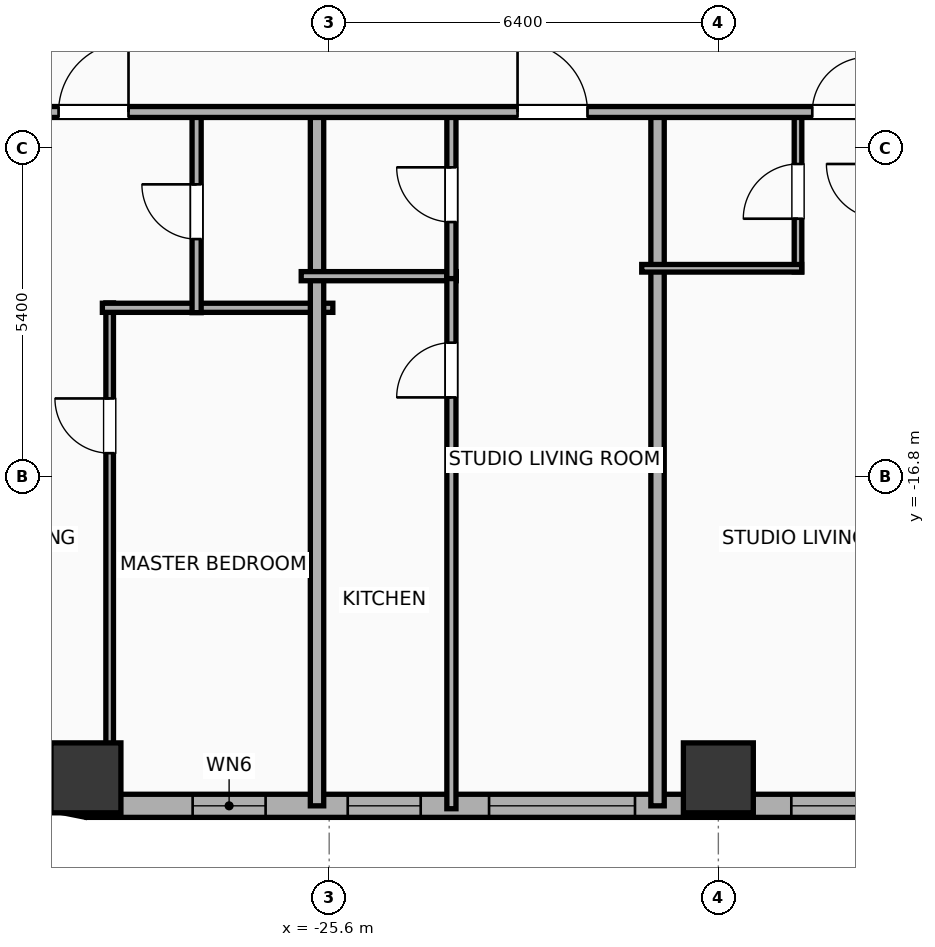
"""IFC4 building model, lengths in metres.
Left out: names, types, materials, properties, quantities, classifications, styles, units other than length and angle.
Written with IfcOpenShell. Run it as: python <this file> out.ifc"""

import sys

from ifc_helpers import new_model, si_unit, direction, frame, frame_2d, origin, origin_2d, place, context, subcontext, project, spatial, rectangle, hollow_rectangle, extrude, element, fill, save


model = new_model("IFC4")
c1 = context("Model", 3, precision=1e-05, world=origin(), true_north=direction((0.0, 1.0)))
c2 = subcontext(c1, "Body", "Model", "MODEL_VIEW")
j1 = project(units=[si_unit("LENGTHUNIT", "METRE"), si_unit("PLANEANGLEUNIT", "RADIAN")], contexts=[c1])
p1 = place(None, origin())
s1 = spatial("IfcSite", under=j1, at=p1, CompositionType="ELEMENT")
p2 = place(p1, origin())
s2 = spatial("IfcBuilding", under=s1, at=p2, CompositionType="ELEMENT")
p3 = place(p2, frame((0.0, 0.0, 29.9)))
s3 = spatial("IfcBuildingStorey", under=s2, at=p3, CompositionType="ELEMENT", Elevation=29.9)
for number, where, z_axis, x_axis in (
    (1, (-29.6, -21.75, 0.0), (0.0, 0.0, 1.0), (1.0, 0.0, 0.0)),
    (2, (-19.2, -21.75, 0.0), (0.0, 0.0, 1.0), (1.0, 0.0, 0.0)),
):
    element("IfcColumn", number, at=place(p3, frame(where, z_axis=z_axis, x_axis=x_axis)), inside=s3, PredefinedType="COLUMN", context=c2, shape_type="SweptSolid", body=[
        extrude(hollow_rectangle(XDim=1.15, YDim=1.15, WallThickness=0.04, at=origin_2d()), origin(), (0.0, 0.0, 1.0), 3.9),
    ])
p4 = place(p3, frame((22.381, -22.21, 0.0), z_axis=(0.0, 0.0, 1.0), x_axis=(-1.0, 0.0, 0.0)))
e3 = element("IfcWall", 3, at=p4, inside=s3, PredefinedType="ELEMENTEDWALL", context=c2, shape_type="SweptSolid", body=[
    extrude(rectangle(XDim=51.963, YDim=0.38, at=frame_2d((25.981, 0.0))), origin(), (0.0, 0.0, 1.0), 2.54),
])
p5 = place(p4, frame((5.81, 0.0, 0.75)))
e4 = element("IfcOpeningElement", 4, at=p5, cuts=e3, PredefinedType="OPENING", context=c2, shape_type="SweptSolid", body=[
    extrude(rectangle(XDim=2.4, YDim=1.63, at=frame_2d((1.2, 0.815))), frame((0.0, 0.2, 0.0), z_axis=(0.0, -1.0, 0.0), x_axis=(1.0, 0.0, 0.0)), (0.0, 0.0, 1.0), 0.4),
])
p6 = place(p4, frame((26.431, 0.0, 0.75)))
e5 = element("IfcOpeningElement", 5, at=p6, cuts=e3, PredefinedType="OPENING", context=c2, shape_type="SweptSolid", body=[
    extrude(rectangle(XDim=2.4, YDim=1.63, at=frame_2d((1.2, 0.815))), frame((0.0, 0.2, 0.0), z_axis=(0.0, -1.0, 0.0), x_axis=(1.0, 0.0, 0.0)), (0.0, 0.0, 1.0), 0.4),
])
p7 = place(p4, frame((42.952, 0.0, 0.75)))
e6 = element("IfcOpeningElement", 6, at=p7, cuts=e3, PredefinedType="OPENING", context=c2, shape_type="SweptSolid", body=[
    extrude(rectangle(XDim=2.4, YDim=1.63, at=frame_2d((1.2, 0.815))), frame((0.0, 0.2, 0.0), z_axis=(0.0, -1.0, 0.0), x_axis=(1.0, 0.0, 0.0)), (0.0, 0.0, 1.0), 0.4),
])
p8 = place(p4, frame((49.027, 0.0, 0.75)))
e7 = element("IfcOpeningElement", 7, at=p8, cuts=e3, PredefinedType="OPENING", context=c2, shape_type="SweptSolid", body=[
    extrude(rectangle(XDim=1.2, YDim=1.63, at=frame_2d((0.6, 0.815))), frame((0.0, 0.2, 0.0), z_axis=(0.0, -1.0, 0.0), x_axis=(1.0, 0.0, 0.0)), (0.0, 0.0, 1.0), 0.4),
])
p9 = place(p4, frame((46.476, 0.0, 0.75)))
e8 = element("IfcOpeningElement", 8, at=p9, cuts=e3, PredefinedType="OPENING", context=c2, shape_type="SweptSolid", body=[
    extrude(rectangle(XDim=1.2, YDim=1.63, at=frame_2d((0.6, 0.815))), frame((0.0, 0.2, 0.0), z_axis=(0.0, -1.0, 0.0), x_axis=(1.0, 0.0, 0.0)), (0.0, 0.0, 1.0), 0.4),
])
p10 = place(p4, frame((39.181, 0.0, 0.75)))
e9 = element("IfcOpeningElement", 9, at=p10, cuts=e3, PredefinedType="OPENING", context=c2, shape_type="SweptSolid", body=[
    extrude(rectangle(XDim=1.2, YDim=1.63, at=frame_2d((0.6, 0.815))), frame((0.0, 0.2, 0.0), z_axis=(0.0, -1.0, 0.0), x_axis=(1.0, 0.0, 0.0)), (0.0, 0.0, 1.0), 0.4),
])
p11 = place(p4, frame((32.476, 0.0, 0.75)))
e10 = element("IfcOpeningElement", 10, at=p11, cuts=e3, PredefinedType="OPENING", context=c2, shape_type="SweptSolid", body=[
    extrude(rectangle(XDim=1.2, YDim=1.63, at=frame_2d((0.6, 0.815))), frame((0.0, 0.2, 0.0), z_axis=(0.0, -1.0, 0.0), x_axis=(1.0, 0.0, 0.0)), (0.0, 0.0, 1.0), 0.4),
])
p12 = place(p4, frame((35.276, 0.0, 0.75)))
e11 = element("IfcOpeningElement", 11, at=p12, cuts=e3, PredefinedType="OPENING", context=c2, shape_type="SweptSolid", body=[
    extrude(rectangle(XDim=1.2, YDim=1.63, at=frame_2d((0.6, 0.815))), frame((0.0, 0.2, 0.0), z_axis=(0.0, -1.0, 0.0), x_axis=(1.0, 0.0, 0.0)), (0.0, 0.0, 1.0), 0.4),
])
p13 = place(p4, frame((29.491, 0.0, 0.75)))
e12 = element("IfcOpeningElement", 12, at=p13, cuts=e3, PredefinedType="OPENING", context=c2, shape_type="SweptSolid", body=[
    extrude(rectangle(XDim=0.85, YDim=1.63, at=frame_2d((0.425, 0.815))), frame((0.0, 0.2, 0.0), z_axis=(0.0, -1.0, 0.0), x_axis=(1.0, 0.0, 0.0)), (0.0, 0.0, 1.0), 0.4),
])
p14 = place(p4, frame((21.596, 0.0, 0.75)))
e13 = element("IfcOpeningElement", 13, at=p14, cuts=e3, PredefinedType="OPENING", context=c2, shape_type="SweptSolid", body=[
    extrude(rectangle(XDim=1.2, YDim=1.63, at=frame_2d((0.6, 0.815))), frame((0.0, 0.2, 0.0), z_axis=(0.0, -1.0, 0.0), x_axis=(1.0, 0.0, 0.0)), (0.0, 0.0, 1.0), 0.4),
])
p15 = place(p4, frame((24.036, 0.0, 0.75)))
e14 = element("IfcOpeningElement", 14, at=p15, cuts=e3, PredefinedType="OPENING", context=c2, shape_type="SweptSolid", body=[
    extrude(rectangle(XDim=1.2, YDim=1.63, at=frame_2d((0.6, 0.815))), frame((0.0, 0.2, 0.0), z_axis=(0.0, -1.0, 0.0), x_axis=(1.0, 0.0, 0.0)), (0.0, 0.0, 1.0), 0.4),
])
p16 = place(p4, frame((17.886, 0.0, 0.75)))
e15 = element("IfcOpeningElement", 15, at=p16, cuts=e3, PredefinedType="OPENING", context=c2, shape_type="SweptSolid", body=[
    extrude(rectangle(XDim=1.2, YDim=1.63, at=frame_2d((0.6, 0.815))), frame((0.0, 0.2, 0.0), z_axis=(0.0, -1.0, 0.0), x_axis=(1.0, 0.0, 0.0)), (0.0, 0.0, 1.0), 0.4),
])
p17 = place(p4, frame((15.086, 0.0, 0.75)))
e16 = element("IfcOpeningElement", 16, at=p17, cuts=e3, PredefinedType="OPENING", context=c2, shape_type="SweptSolid", body=[
    extrude(rectangle(XDim=1.2, YDim=1.63, at=frame_2d((0.6, 0.815))), frame((0.0, 0.2, 0.0), z_axis=(0.0, -1.0, 0.0), x_axis=(1.0, 0.0, 0.0)), (0.0, 0.0, 1.0), 0.4),
])
p18 = place(p4, frame((11.181, 0.0, 0.75)))
e17 = element("IfcOpeningElement", 17, at=p18, cuts=e3, PredefinedType="OPENING", context=c2, shape_type="SweptSolid", body=[
    extrude(rectangle(XDim=1.2, YDim=1.63, at=frame_2d((0.6, 0.815))), frame((0.0, 0.2, 0.0), z_axis=(0.0, -1.0, 0.0), x_axis=(1.0, 0.0, 0.0)), (0.0, 0.0, 1.0), 0.4),
])
p19 = place(p4, frame((3.886, 0.0, 0.75)))
e18 = element("IfcOpeningElement", 18, at=p19, cuts=e3, PredefinedType="OPENING", context=c2, shape_type="SweptSolid", body=[
    extrude(rectangle(XDim=1.2, YDim=1.63, at=frame_2d((0.6, 0.815))), frame((0.0, 0.2, 0.0), z_axis=(0.0, -1.0, 0.0), x_axis=(1.0, 0.0, 0.0)), (0.0, 0.0, 1.0), 0.4),
])
p20 = place(p4, frame((1.536, 0.0, 0.75)))
e19 = element("IfcOpeningElement", 19, at=p20, cuts=e3, PredefinedType="OPENING", context=c2, shape_type="SweptSolid", body=[
    extrude(rectangle(XDim=1.2, YDim=1.63, at=frame_2d((0.6, 0.815))), frame((0.0, 0.2, 0.0), z_axis=(0.0, -1.0, 0.0), x_axis=(1.0, 0.0, 0.0)), (0.0, 0.0, 1.0), 0.4),
])
p21 = place(p3, frame((-29.581, -22.21, 0.0), z_axis=(0.0, 0.0, 1.0), x_axis=(-0.980786132421, 0.195086038585, 0.0)))
e20 = element("IfcWall", 20, at=p21, inside=s3, PredefinedType="ELEMENTEDWALL", context=c2, shape_type="SweptSolid", body=[
    extrude(rectangle(XDim=1.504, YDim=0.38, at=frame_2d((0.752, 0.0))), origin(), (0.0, 0.0, 1.0), 2.54),
])
p22 = place(p3, frame((-29.21, -22.36, 0.0), z_axis=(0.0, 0.0, 1.0), x_axis=(0.0, 1.0, 0.0)))
e21 = element("IfcWall", 21, at=p22, inside=s3, PredefinedType="PARTITIONING", context=c2, shape_type="SweptSolid", body=[
    extrude(rectangle(XDim=8.42, YDim=0.125, at=frame_2d((4.21, 0.0))), origin(), (0.0, 0.0, 1.0), 3.65),
])
p23 = place(p22, frame((5.949, 0.0, 0.0)))
e22 = element("IfcOpeningElement", 22, at=p23, cuts=e21, PredefinedType="OPENING", context=c2, shape_type="SweptSolid", body=[
    extrude(rectangle(XDim=0.9, YDim=2.05, at=frame_2d((0.45, 1.025))), frame((0.0, 0.073, 0.0), z_axis=(0.0, -1.0, 0.0), x_axis=(1.0, 0.0, 0.0)), (0.0, 0.0, 1.0), 0.145),
])
p24 = place(p3, frame((-29.33, -14.02, 0.0), z_axis=(0.0, 0.0, 1.0), x_axis=(1.0, 0.0, 0.0)))
e23 = element("IfcWall", 23, at=p24, inside=s3, PredefinedType="PLUMBINGWALL", context=c2, shape_type="SweptSolid", body=[
    extrude(rectangle(XDim=3.79, YDim=0.15, at=frame_2d((1.895, 0.0))), origin(), (0.0, 0.0, 1.0), 3.65),
])
p25 = place(p3, frame((-27.78, -14.1, 0.0), z_axis=(0.0, 0.0, 1.0), x_axis=(0.0, 1.0, 0.0)))
e24 = element("IfcWall", 24, at=p25, inside=s3, PredefinedType="PLUMBINGWALL", context=c2, shape_type="SweptSolid", body=[
    extrude(rectangle(XDim=3.32, YDim=0.15, at=frame_2d((1.66, 0.0))), origin(), (0.0, 0.0, 1.0), 3.65),
])
p26 = place(p25, frame((1.21, 0.0, 0.0)))
e25 = element("IfcOpeningElement", 25, at=p26, cuts=e24, PredefinedType="OPENING", context=c2, shape_type="SweptSolid", body=[
    extrude(rectangle(XDim=0.9, YDim=2.05, at=frame_2d((0.45, 1.025))), frame((0.0, 0.085, 0.0), z_axis=(0.0, -1.0, 0.0), x_axis=(1.0, 0.0, 0.0)), (0.0, 0.0, 1.0), 0.17),
])
p27 = place(p3, frame((-25.8, -22.21, 0.0), z_axis=(0.0, 0.0, 1.0), x_axis=(0.0, 1.0, 0.0)))
e26 = element("IfcWall", 26, at=p27, inside=s3, PredefinedType="PARTITIONING", context=c2, shape_type="SweptSolid", body=[
    extrude(rectangle(XDim=11.49, YDim=0.22, at=frame_2d((5.745, 0.0))), origin(), (0.0, 0.0, 1.0), 3.65),
])
p28 = place(p3, frame((-26.06, -13.5, 0.0), z_axis=(0.0, 0.0, 1.0), x_axis=(1.0, 0.0, 0.0)))
e27 = element("IfcWall", 27, at=p28, inside=s3, PredefinedType="PLUMBINGWALL", context=c2, shape_type="SweptSolid", body=[
    extrude(rectangle(XDim=2.55, YDim=0.15, at=frame_2d((1.275, 0.0))), origin(), (0.0, 0.0, 1.0), 3.65),
])
p29 = place(p3, frame((-23.59, -22.258, 0.0), z_axis=(0.0, 0.0, 1.0), x_axis=(0.0, 1.0, 0.0)))
e28 = element("IfcWall", 28, at=p29, inside=s3, PredefinedType="PLUMBINGWALL", context=c2, shape_type="SweptSolid", body=[
    extrude(rectangle(XDim=8.798, YDim=0.15, at=frame_2d((4.399, 0.0))), origin(), (0.0, 0.0, 1.0), 3.65),
])
p30 = place(p29, frame((6.764, 0.0, 0.0)))
e29 = element("IfcOpeningElement", 29, at=p30, cuts=e28, PredefinedType="OPENING", context=c2, shape_type="SweptSolid", body=[
    extrude(rectangle(XDim=0.9, YDim=2.05, at=frame_2d((0.45, 1.025))), frame((0.0, 0.085, 0.0), z_axis=(0.0, -1.0, 0.0), x_axis=(1.0, 0.0, 0.0)), (0.0, 0.0, 1.0), 0.17),
])
p31 = place(p3, frame((-23.59, -13.54, 0.0), z_axis=(0.0, 0.0, 1.0), x_axis=(0.0, 1.0, 0.0)))
e30 = element("IfcWall", 30, at=p31, inside=s3, PredefinedType="PLUMBINGWALL", context=c2, shape_type="SweptSolid", body=[
    extrude(rectangle(XDim=2.76, YDim=0.15, at=frame_2d((1.38, 0.0))), origin(), (0.0, 0.0, 1.0), 3.65),
])
p32 = place(p31, frame((0.93, 0.0, 0.0)))
e31 = element("IfcOpeningElement", 31, at=p32, cuts=e30, PredefinedType="OPENING", context=c2, shape_type="SweptSolid", body=[
    extrude(rectangle(XDim=0.9, YDim=2.05, at=frame_2d((0.45, 1.025))), frame((0.0, 0.085, 0.0), z_axis=(0.0, -1.0, 0.0), x_axis=(1.0, 0.0, 0.0)), (0.0, 0.0, 1.0), 0.17),
])
p33 = place(p3, frame((-20.2, -22.21, 0.0), z_axis=(0.0, 0.0, 1.0), x_axis=(0.0, 1.0, 0.0)))
e32 = element("IfcWall", 32, at=p33, inside=s3, PredefinedType="PARTITIONING", context=c2, shape_type="SweptSolid", body=[
    extrude(rectangle(XDim=11.49, YDim=0.22, at=frame_2d((5.745, 0.0))), origin(), (0.0, 0.0, 1.0), 3.65),
])
p34 = place(p3, frame((-17.89, -13.43, 0.0), z_axis=(0.0, 0.0, 1.0), x_axis=(0.0, 1.0, 0.0)))
e33 = element("IfcWall", 33, at=p34, inside=s3, PredefinedType="PARTITIONING", context=c2, shape_type="SweptSolid", body=[
    extrude(rectangle(XDim=2.65, YDim=0.125, at=frame_2d((1.325, 0.0))), origin(), (0.0, 0.0, 1.0), 3.65),
])
p35 = place(p34, frame((0.875, 0.0, 0.0)))
e34 = element("IfcOpeningElement", 34, at=p35, cuts=e33, PredefinedType="OPENING", context=c2, shape_type="SweptSolid", body=[
    extrude(rectangle(XDim=0.9, YDim=2.05, at=frame_2d((0.45, 1.025))), frame((0.0, 0.073, 0.0), z_axis=(0.0, -1.0, 0.0), x_axis=(1.0, 0.0, 0.0)), (0.0, 0.0, 1.0), 0.145),
])
p36 = place(p3, frame((-20.46, -13.37, 0.0), z_axis=(0.0, 0.0, 1.0), x_axis=(1.0, 0.0, 0.0)))
e35 = element("IfcWall", 35, at=p36, inside=s3, PredefinedType="PARTITIONING", context=c2, shape_type="SweptSolid", body=[
    extrude(rectangle(XDim=2.63, YDim=0.125, at=frame_2d((1.315, 0.0))), origin(), (0.0, 0.0, 1.0), 3.65),
])
p37 = place(p3, frame((-33.41, -10.8, 0.0), z_axis=(0.0, 0.0, 1.0), x_axis=(1.0, 0.0, 0.0)))
e36 = element("IfcWall", 36, at=p37, inside=s3, PredefinedType="PARTITIONING", context=c2, shape_type="SweptSolid", body=[
    extrude(rectangle(XDim=59.62, YDim=0.18, at=frame_2d((29.81, 0.0))), origin(), (0.0, 0.0, 1.0), 3.65),
])
p38 = place(p37, frame((3.36, 0.0, 0.0)))
e37 = element("IfcOpeningElement", 37, at=p38, cuts=e36, PredefinedType="OPENING", context=c2, shape_type="SweptSolid", body=[
    extrude(rectangle(XDim=1.15, YDim=2.05, at=frame_2d((0.575, 1.025))), frame((0.0, 0.1, 0.0), z_axis=(0.0, -1.0, 0.0), x_axis=(1.0, 0.0, 0.0)), (0.0, 0.0, 1.0), 0.2),
])
p39 = place(p37, frame((10.908, 0.0, 0.0)))
e38 = element("IfcOpeningElement", 38, at=p39, cuts=e36, PredefinedType="OPENING", context=c2, shape_type="SweptSolid", body=[
    extrude(rectangle(XDim=1.15, YDim=2.05, at=frame_2d((0.575, 1.025))), frame((0.0, 0.1, 0.0), z_axis=(0.0, -1.0, 0.0), x_axis=(1.0, 0.0, 0.0)), (0.0, 0.0, 1.0), 0.2),
])
p40 = place(p37, frame((15.755, 0.0, 0.0)))
e39 = element("IfcOpeningElement", 39, at=p40, cuts=e36, PredefinedType="OPENING", context=c2, shape_type="SweptSolid", body=[
    extrude(rectangle(XDim=0.9, YDim=2.05, at=frame_2d((0.45, 1.025))), frame((0.0, 0.1, 0.0), z_axis=(0.0, -1.0, 0.0), x_axis=(1.0, 0.0, 0.0)), (0.0, 0.0, 1.0), 0.2),
])
p41 = place(p37, frame((22.11, 0.0, 0.0)))
e40 = element("IfcOpeningElement", 40, at=p41, cuts=e36, PredefinedType="OPENING", context=c2, shape_type="SweptSolid", body=[
    extrude(rectangle(XDim=1.15, YDim=2.05, at=frame_2d((0.575, 1.025))), frame((0.0, 0.1, 0.0), z_axis=(0.0, -1.0, 0.0), x_axis=(1.0, 0.0, 0.0)), (0.0, 0.0, 1.0), 0.2),
])
p42 = place(p37, frame((27.709, 0.0, 0.0)))
e41 = element("IfcOpeningElement", 41, at=p42, cuts=e36, PredefinedType="OPENING", context=c2, shape_type="SweptSolid", body=[
    extrude(rectangle(XDim=1.15, YDim=2.05, at=frame_2d((0.575, 1.025))), frame((0.0, 0.1, 0.0), z_axis=(0.0, -1.0, 0.0), x_axis=(1.0, 0.0, 0.0)), (0.0, 0.0, 1.0), 0.2),
])
p43 = place(p37, frame((33.349, 0.0, 0.0)))
e42 = element("IfcOpeningElement", 42, at=p43, cuts=e36, PredefinedType="OPENING", context=c2, shape_type="SweptSolid", body=[
    extrude(rectangle(XDim=1.15, YDim=2.05, at=frame_2d((0.575, 1.025))), frame((0.0, 0.1, 0.0), z_axis=(0.0, -1.0, 0.0), x_axis=(1.0, 0.0, 0.0)), (0.0, 0.0, 1.0), 0.2),
])
p44 = place(p37, frame((36.759, 0.0, 0.0)))
e43 = element("IfcOpeningElement", 43, at=p44, cuts=e36, PredefinedType="OPENING", context=c2, shape_type="SweptSolid", body=[
    extrude(rectangle(XDim=1.15, YDim=2.05, at=frame_2d((0.575, 1.025))), frame((0.0, 0.1, 0.0), z_axis=(0.0, -1.0, 0.0), x_axis=(1.0, 0.0, 0.0)), (0.0, 0.0, 1.0), 0.2),
])
p45 = place(p37, frame((43.752, 0.0, 0.0)))
e44 = element("IfcOpeningElement", 44, at=p45, cuts=e36, PredefinedType="OPENING", context=c2, shape_type="SweptSolid", body=[
    extrude(rectangle(XDim=0.9, YDim=2.05, at=frame_2d((0.45, 1.025))), frame((0.0, 0.1, 0.0), z_axis=(0.0, -1.0, 0.0), x_axis=(1.0, 0.0, 0.0)), (0.0, 0.0, 1.0), 0.2),
])
p46 = place(p37, frame((47.962, 0.0, 0.0)))
e45 = element("IfcOpeningElement", 45, at=p46, cuts=e36, PredefinedType="OPENING", context=c2, shape_type="SweptSolid", body=[
    extrude(rectangle(XDim=1.15, YDim=2.05, at=frame_2d((0.575, 1.025))), frame((0.0, 0.1, 0.0), z_axis=(0.0, -1.0, 0.0), x_axis=(1.0, 0.0, 0.0)), (0.0, 0.0, 1.0), 0.2),
])
p47 = place(p37, frame((55.641, 0.0, 0.0)))
e46 = element("IfcOpeningElement", 46, at=p47, cuts=e36, PredefinedType="OPENING", context=c2, shape_type="SweptSolid", body=[
    extrude(rectangle(XDim=1.15, YDim=2.05, at=frame_2d((0.575, 1.025))), frame((0.0, 0.1, 0.0), z_axis=(0.0, -1.0, 0.0), x_axis=(1.0, 0.0, 0.0)), (0.0, 0.0, 1.0), 0.2),
])
p48 = place(p7, origin())
e47 = element("IfcWindow", 47, at=p48, inside=s3, PartitioningType="SINGLE_PANEL", PredefinedType="WINDOW", context=c2, shape_type="SweptSolid", body=[
    extrude(rectangle(XDim=2.4, YDim=1.63, at=frame_2d((1.2, 0.815))), frame((0.0, 0.03, 0.0), z_axis=(0.0, -1.0, 0.0), x_axis=(1.0, 0.0, 0.0)), (0.0, 0.0, 1.0), 0.06),
])
fill(e6, e47)
p49 = place(p8, origin())
e48 = element("IfcWindow", 48, at=p49, inside=s3, PartitioningType="SINGLE_PANEL", PredefinedType="WINDOW", context=c2, shape_type="SweptSolid", body=[
    extrude(rectangle(XDim=1.2, YDim=1.63, at=frame_2d((0.6, 0.815))), frame((0.0, 0.03, 0.0), z_axis=(0.0, -1.0, 0.0), x_axis=(1.0, 0.0, 0.0)), (0.0, 0.0, 1.0), 0.06),
])
fill(e7, e48)
p50 = place(p9, origin())
e49 = element("IfcWindow", 49, at=p50, inside=s3, PartitioningType="SINGLE_PANEL", PredefinedType="WINDOW", context=c2, shape_type="SweptSolid", body=[
    extrude(rectangle(XDim=1.2, YDim=1.63, at=frame_2d((0.6, 0.815))), frame((0.0, 0.03, 0.0), z_axis=(0.0, -1.0, 0.0), x_axis=(1.0, 0.0, 0.0)), (0.0, 0.0, 1.0), 0.06),
])
fill(e8, e49)
p51 = place(p10, origin())
e50 = element("IfcWindow", 50, at=p51, inside=s3, PartitioningType="SINGLE_PANEL", PredefinedType="WINDOW", context=c2, shape_type="SweptSolid", body=[
    extrude(rectangle(XDim=1.2, YDim=1.63, at=frame_2d((0.6, 0.815))), frame((0.0, 0.03, 0.0), z_axis=(0.0, -1.0, 0.0), x_axis=(1.0, 0.0, 0.0)), (0.0, 0.0, 1.0), 0.06),
])
fill(e9, e50)
p52 = place(p23, origin())
e51 = element("IfcDoor", 51, at=p52, inside=s3, OperationType="SINGLE_SWING_RIGHT", PredefinedType="DOOR", context=c2, shape_type="SweptSolid", body=[
    extrude(rectangle(XDim=0.9, YDim=2.05, at=frame_2d((0.45, 1.025))), frame((0.0, 0.025, 0.0), z_axis=(0.0, -1.0, 0.0), x_axis=(1.0, 0.0, 0.0)), (0.0, 0.0, 1.0), 0.05),
])
fill(e22, e51)
p53 = place(p26, origin())
e52 = element("IfcDoor", 52, at=p53, inside=s3, OperationType="SINGLE_SWING_RIGHT", PredefinedType="DOOR", context=c2, shape_type="SweptSolid", body=[
    extrude(rectangle(XDim=0.9, YDim=2.05, at=frame_2d((0.45, 1.025))), frame((0.0, 0.025, 0.0), z_axis=(0.0, -1.0, 0.0), x_axis=(1.0, 0.0, 0.0)), (0.0, 0.0, 1.0), 0.05),
])
fill(e25, e52)
p54 = place(p30, origin())
e53 = element("IfcDoor", 53, at=p54, inside=s3, OperationType="SINGLE_SWING_LEFT", PredefinedType="DOOR", context=c2, shape_type="SweptSolid", body=[
    extrude(rectangle(XDim=0.9, YDim=2.05, at=frame_2d((0.45, 1.025))), frame((0.0, 0.025, 0.0), z_axis=(0.0, -1.0, 0.0), x_axis=(1.0, 0.0, 0.0)), (0.0, 0.0, 1.0), 0.05),
])
fill(e29, e53)
p55 = place(p32, origin())
e54 = element("IfcDoor", 54, at=p55, inside=s3, OperationType="SINGLE_SWING_RIGHT", PredefinedType="DOOR", context=c2, shape_type="SweptSolid", body=[
    extrude(rectangle(XDim=0.9, YDim=2.05, at=frame_2d((0.45, 1.025))), frame((0.0, 0.025, 0.0), z_axis=(0.0, -1.0, 0.0), x_axis=(1.0, 0.0, 0.0)), (0.0, 0.0, 1.0), 0.05),
])
fill(e31, e54)
p56 = place(p35, origin())
e55 = element("IfcDoor", 55, at=p56, inside=s3, OperationType="SINGLE_SWING_LEFT", PredefinedType="DOOR", context=c2, shape_type="SweptSolid", body=[
    extrude(rectangle(XDim=0.9, YDim=2.05, at=frame_2d((0.45, 1.025))), frame((0.0, 0.025, 0.0), z_axis=(0.0, -1.0, 0.0), x_axis=(1.0, 0.0, 0.0)), (0.0, 0.0, 1.0), 0.05),
])
fill(e34, e55)
p57 = place(p38, origin())
e56 = element("IfcDoor", 56, at=p57, inside=s3, OperationType="SINGLE_SWING_RIGHT", PredefinedType="DOOR", context=c2, shape_type="SweptSolid", body=[
    extrude(rectangle(XDim=1.15, YDim=2.05, at=frame_2d((0.575, 1.025))), frame((0.0, 0.025, 0.0), z_axis=(0.0, -1.0, 0.0), x_axis=(1.0, 0.0, 0.0)), (0.0, 0.0, 1.0), 0.05),
])
fill(e37, e56)
p58 = place(p39, origin())
e57 = element("IfcDoor", 57, at=p58, inside=s3, OperationType="SINGLE_SWING_LEFT", PredefinedType="DOOR", context=c2, shape_type="SweptSolid", body=[
    extrude(rectangle(XDim=1.15, YDim=2.05, at=frame_2d((0.575, 1.025))), frame((0.0, 0.025, 0.0), z_axis=(0.0, -1.0, 0.0), x_axis=(1.0, 0.0, 0.0)), (0.0, 0.0, 1.0), 0.05),
])
fill(e38, e57)
p59 = place(p40, origin())
e58 = element("IfcDoor", 58, at=p59, inside=s3, OperationType="SINGLE_SWING_RIGHT", PredefinedType="DOOR", context=c2, shape_type="SweptSolid", body=[
    extrude(rectangle(XDim=0.9, YDim=2.05, at=frame_2d((0.45, 1.025))), frame((0.0, 0.025, 0.0), z_axis=(0.0, -1.0, 0.0), x_axis=(1.0, 0.0, 0.0)), (0.0, 0.0, 1.0), 0.05),
])
fill(e39, e58)
save(model, sys.argv[1])
